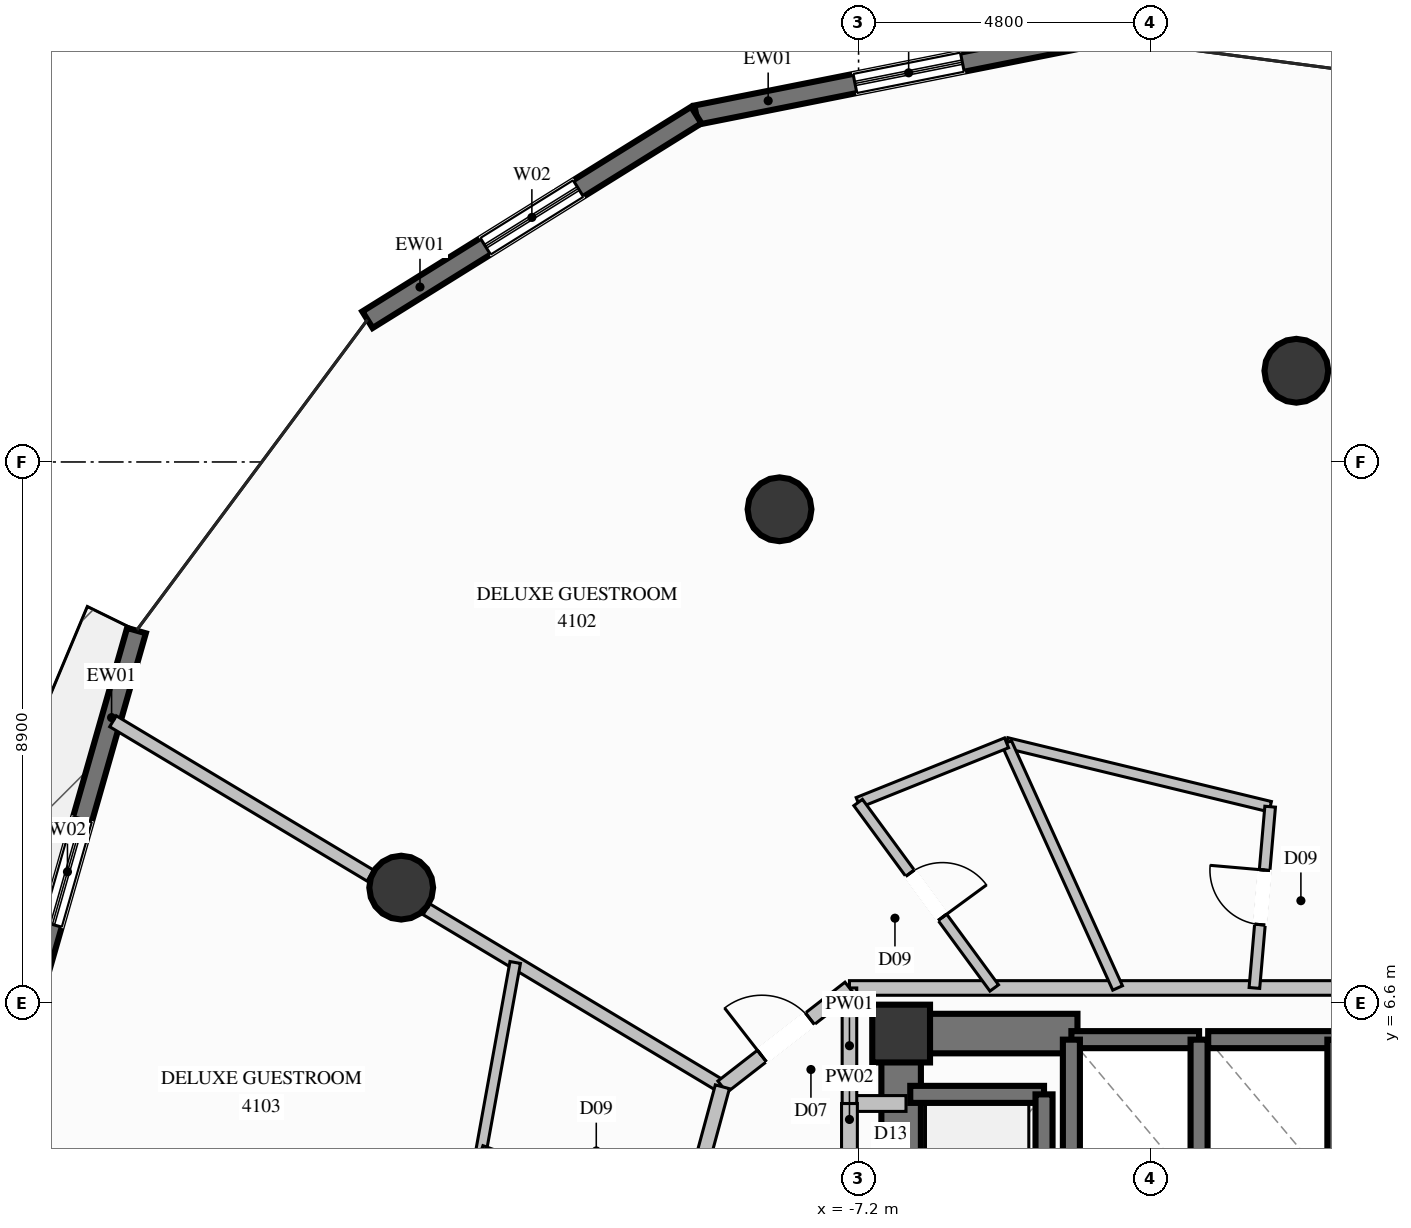
"""IFC4 building model, lengths in metres.
Left out: names, types, materials, properties, quantities, classifications, styles, units other than length and angle.
Written with IfcOpenShell. Run it as: python <this file> out.ifc"""

import sys

from ifc_helpers import new_model, si_unit, direction, frame, frame_2d, origin, origin_2d, place, context, subcontext, project, spatial, rectangle, circle, extrude, element, fill, save


model = new_model("IFC4")
c1 = context("Model", 3, precision=1e-05, world=origin(), true_north=direction((0.0, 1.0)))
c2 = subcontext(c1, "Body", "Model", "MODEL_VIEW")
j1 = project(units=[si_unit("LENGTHUNIT", "METRE"), si_unit("PLANEANGLEUNIT", "RADIAN")], contexts=[c1])
p1 = place(None, origin())
s1 = spatial("IfcSite", under=j1, at=p1, CompositionType="ELEMENT")
p2 = place(p1, origin())
s2 = spatial("IfcBuilding", under=s1, at=p2, CompositionType="ELEMENT")
p3 = place(p2, frame((0.0, 0.0, 153.0)))
s3 = spatial("IfcBuildingStorey", under=s2, at=p3, CompositionType="ELEMENT", Elevation=153.0)
p4 = place(p3, frame((-6.5, 6.1, 0.0), z_axis=(0.0, 0.0, 1.0), x_axis=(1.0, 0.0, 0.0)))
e1 = element("IfcColumn", 1, at=p4, inside=s3, PredefinedType="COLUMN", context=c2, shape_type="SweptSolid", body=[
    extrude(rectangle(XDim=0.95, YDim=0.95, at=origin_2d()), origin(), (0.0, 0.0, 1.0), 3.6),
])
p5 = place(p3, frame((-6.175, 6.1, 0.0), z_axis=(0.0, 0.0, 1.0), x_axis=(1.0, 0.0, 0.0)))
e2 = element("IfcWall", 2, at=p5, inside=s3, PredefinedType="SHEAR", context=c2, shape_type="SweptSolid", body=[
    extrude(rectangle(XDim=2.575, YDim=0.65, at=frame_2d((1.288, 0.0))), origin(), (0.0, 0.0, 1.0), 3.6),
])
p6 = place(p3, frame((-6.5, 2.35, 0.0), z_axis=(0.0, 0.0, 1.0), x_axis=(0.0, 1.0, 0.0)))
e3 = element("IfcWall", 3, at=p6, inside=s3, PredefinedType="SHEAR", context=c2, shape_type="SweptSolid", body=[
    extrude(rectangle(XDim=4.075, YDim=0.65, at=frame_2d((2.038, 0.0))), origin(), (0.0, 0.0, 1.0), 3.6),
])
for number, where, z_axis, x_axis in (
    (4, (0.0, 17.0, 0.0), (0.0, 0.0, 1.0), (1.0, 0.0, 0.0)),
    (5, (-8.5, 14.722, 0.0), (0.0, 0.0, 1.0), (1.0, 0.0, 0.0)),
    (6, (-14.722, 8.5, 0.0), (0.0, 0.0, 1.0), (1.0, 0.0, 0.0)),
):
    element("IfcColumn", number, at=place(p3, frame(where, z_axis=z_axis, x_axis=x_axis)), inside=s3, PredefinedType="COLUMN", context=c2, shape_type="SweptSolid", body=[
        extrude(circle(Radius=0.525, at=origin_2d()), origin(), (0.0, 0.0, 1.0), 3.6),
    ])
p7 = place(p3, frame((-9.869, 21.205, 0.0), z_axis=(0.0, 0.0, 1.0), x_axis=(0.980781820462, 0.195107715508, 0.0)))
e7 = element("IfcWall", 7, at=p7, inside=s3, PredefinedType="SOLIDWALL", context=c2, shape_type="SweptSolid", body=[
    extrude(rectangle(XDim=6.612, YDim=0.32, at=frame_2d((3.306, 0.0))), origin(), (0.0, 0.0, 1.0), 3.35),
])
p8 = place(p7, frame((2.661, 0.0, 0.35)))
e8 = element("IfcOpeningElement", 8, at=p8, cuts=e7, PredefinedType="OPENING", context=c2, shape_type="SweptSolid", body=[
    extrude(rectangle(XDim=1.8, YDim=2.6, at=frame_2d((0.9, 1.3))), frame((0.0, 0.17, 0.0), z_axis=(0.0, -1.0, 0.0), x_axis=(1.0, 0.0, 0.0)), (0.0, 0.0, 1.0), 0.34),
])
p9 = place(p3, frame((-15.277, 17.839, 0.0), z_axis=(0.0, 0.0, 1.0), x_axis=(0.848995855188, 0.528399505935, 0.0)))
e9 = element("IfcWall", 9, at=p9, inside=s3, PredefinedType="SOLIDWALL", context=c2, shape_type="SweptSolid", body=[
    extrude(rectangle(XDim=6.37, YDim=0.32, at=frame_2d((3.185, 0.0))), origin(), (0.0, 0.0, 1.0), 3.35),
])
p10 = place(p9, frame((2.285, 0.0, 0.35)))
e10 = element("IfcOpeningElement", 10, at=p10, cuts=e9, PredefinedType="OPENING", context=c2, shape_type="SweptSolid", body=[
    extrude(rectangle(XDim=1.8, YDim=2.6, at=frame_2d((0.9, 1.3))), frame((0.0, 0.17, 0.0), z_axis=(0.0, -1.0, 0.0), x_axis=(1.0, 0.0, 0.0)), (0.0, 0.0, 1.0), 0.34),
])
p11 = place(p3, frame((-20.895, 6.369, 0.0), z_axis=(0.0, 0.0, 1.0), x_axis=(0.275067292431, 0.961424976082, 0.0)))
e11 = element("IfcWall", 11, at=p11, inside=s3, PredefinedType="SOLIDWALL", context=c2, shape_type="SweptSolid", body=[
    extrude(rectangle(XDim=6.613, YDim=0.32, at=frame_2d((3.307, 0.0))), origin(), (0.0, 0.0, 1.0), 3.35),
])
p12 = place(p11, frame((1.587, 0.0, 0.35)))
e12 = element("IfcOpeningElement", 12, at=p12, cuts=e11, PredefinedType="OPENING", context=c2, shape_type="SweptSolid", body=[
    extrude(rectangle(XDim=1.8, YDim=2.6, at=frame_2d((0.9, 1.3))), frame((0.0, 0.17, 0.0), z_axis=(0.0, -1.0, 0.0), x_axis=(1.0, 0.0, 0.0)), (0.0, 0.0, 1.0), 0.34),
])
p13 = place(p3, frame((-1.6, 6.0, 0.0), z_axis=(0.0, 0.0, 1.0), x_axis=(-1.0, 0.0, 0.0)))
e13 = element("IfcWall", 13, at=p13, inside=s3, PredefinedType="SOLIDWALL", context=c2, shape_type="SweptSolid", body=[
    extrude(rectangle(XDim=2.1, YDim=0.28, at=frame_2d((1.05, 0.0))), origin(), (0.0, 0.0, 1.0), 3.35),
])
for number, where, z_axis, x_axis in (
    (14, (-3.7, 6.0, 0.0), (0.0, 0.0, 1.0), (0.0, -1.0, 0.0)),
    (15, (-1.6, 3.5, 0.0), (0.0, 0.0, 1.0), (0.0, 1.0, 0.0)),
):
    element("IfcWall", number, at=place(p3, frame(where, z_axis=z_axis, x_axis=x_axis)), inside=s3, PredefinedType="SOLIDWALL", context=c2, shape_type="SweptSolid", body=[
        extrude(rectangle(XDim=2.5, YDim=0.28, at=frame_2d((1.25, 0.0))), origin(), (0.0, 0.0, 1.0), 3.35),
    ])
p14 = place(p3, frame((0.65, 6.0, 0.0), z_axis=(0.0, 0.0, 1.0), x_axis=(-1.0, 0.0, 0.0)))
e16 = element("IfcWall", 16, at=p14, inside=s3, PredefinedType="SOLIDWALL", context=c2, shape_type="SweptSolid", body=[
    extrude(rectangle(XDim=2.1, YDim=0.28, at=frame_2d((1.05, 0.0))), origin(), (0.0, 0.0, 1.0), 3.35),
])
p15 = place(p3, frame((0.65, 3.5, 0.0), z_axis=(0.0, 0.0, 1.0), x_axis=(0.0, 1.0, 0.0)))
e17 = element("IfcWall", 17, at=p15, inside=s3, PredefinedType="SOLIDWALL", context=c2, shape_type="SweptSolid", body=[
    extrude(rectangle(XDim=2.5, YDim=0.28, at=frame_2d((1.25, 0.0))), origin(), (0.0, 0.0, 1.0), 3.35),
])
p16 = place(p3, frame((-4.15, 5.1, 0.0), z_axis=(0.0, 0.0, 1.0), x_axis=(-1.0, 0.0, 0.0)))
e18 = element("IfcWall", 18, at=p16, inside=s3, PredefinedType="SOLIDWALL", context=c2, shape_type="SweptSolid", body=[
    extrude(rectangle(XDim=2.2, YDim=0.28, at=frame_2d((1.1, 0.0))), origin(), (0.0, 0.0, 1.0), 3.35),
])
p17 = place(p3, frame((-4.15, 2.4, 0.0), z_axis=(0.0, 0.0, 1.0), x_axis=(0.0, 1.0, 0.0)))
e19 = element("IfcWall", 19, at=p17, inside=s3, PredefinedType="SOLIDWALL", context=c2, shape_type="SweptSolid", body=[
    extrude(rectangle(XDim=2.7, YDim=0.28, at=frame_2d((1.35, 0.0))), origin(), (0.0, 0.0, 1.0), 3.35),
])
p18 = place(p3, frame((-7.35, 4.95, 0.0), z_axis=(0.0, 0.0, 1.0), x_axis=(1.0, 0.0, 0.0)))
e20 = element("IfcWall", 20, at=p18, inside=s3, PredefinedType="PARTITIONING", context=c2, shape_type="SweptSolid", body=[
    extrude(rectangle(XDim=0.93, YDim=0.26, at=frame_2d((0.465, 0.0))), origin(), (0.0, 0.0, 1.0), 3.35),
])
p19 = place(p3, frame((-7.35, 2.55, 0.0), z_axis=(0.0, 0.0, 1.0), x_axis=(0.0, 1.0, 0.0)))
e21 = element("IfcWall", 21, at=p19, inside=s3, PredefinedType="PARTITIONING", context=c2, shape_type="SweptSolid", body=[
    extrude(rectangle(XDim=2.4, YDim=0.26, at=frame_2d((1.2, 0.0))), origin(), (0.0, 0.0, 1.0), 2.435),
])
p20 = place(p19, frame((0.775, 0.0, 0.0)))
e22 = element("IfcOpeningElement", 22, at=p20, cuts=e21, PredefinedType="OPENING", context=c2, shape_type="SweptSolid", body=[
    extrude(rectangle(XDim=0.85, YDim=2.05, at=frame_2d((0.425, 1.025))), frame((0.0, 0.14, 0.0), z_axis=(0.0, -1.0, 0.0), x_axis=(1.0, 0.0, 0.0)), (0.0, 0.0, 1.0), 0.28),
])
p21 = place(p3, frame((-7.35, 6.85, 0.0), z_axis=(0.0, 0.0, 1.0), x_axis=(1.0, 0.0, 0.0)))
e23 = element("IfcWall", 23, at=p21, inside=s3, PredefinedType="PARTITIONING", context=c2, shape_type="SweptSolid", body=[
    extrude(rectangle(XDim=14.7, YDim=0.24, at=frame_2d((7.35, 0.0))), origin(), (0.0, 0.0, 1.0), 2.435),
])
p22 = place(p3, frame((-7.35, 4.95, 0.0), z_axis=(0.0, 0.0, 1.0), x_axis=(0.0, 1.0, 0.0)))
e24 = element("IfcWall", 24, at=p22, inside=s3, PredefinedType="PARTITIONING", context=c2, shape_type="SweptSolid", body=[
    extrude(rectangle(XDim=1.9, YDim=0.24, at=frame_2d((0.95, 0.0))), origin(), (0.0, 0.0, 1.0), 2.435),
])
p23 = place(p3, frame((-9.44, 5.225, 0.0), z_axis=(0.0, 0.0, 1.0), x_axis=(-0.857568811906, 0.514369257291, 0.0)))
e25 = element("IfcWall", 25, at=p23, inside=s3, PredefinedType="PARTITIONING", context=c2, shape_type="SweptSolid", body=[
    extrude(rectangle(XDim=5.677, YDim=0.21, at=frame_2d((2.838, 0.0))), origin(), (0.0, 0.0, 1.0), 2.791),
])
p24 = place(p3, frame((-15.23, 8.698, 0.0), z_axis=(0.0, 0.0, 1.0), x_axis=(-0.857588949281, 0.514335682285, 0.0)))
e26 = element("IfcWall", 26, at=p24, inside=s3, PredefinedType="PARTITIONING", context=c2, shape_type="SweptSolid", body=[
    extrude(rectangle(XDim=4.935, YDim=0.21, at=frame_2d((2.467, 0.0))), origin(), (0.0, 0.0, 1.0), 3.35),
])
p25 = place(p3, frame((-4.766, 10.881, 0.0), z_axis=(0.0, 0.0, 1.0), x_axis=(0.971896797285, -0.235407339366, 0.0)))
e27 = element("IfcWall", 27, at=p25, inside=s3, PredefinedType="PLUMBINGWALL", context=c2, shape_type="SweptSolid", body=[
    extrude(rectangle(XDim=4.46, YDim=0.175, at=frame_2d((2.23, 0.0))), origin(), (0.0, 0.0, 1.0), 2.985),
])
p26 = place(p3, frame((-4.766, 10.881, 0.0), z_axis=(0.0, 0.0, 1.0), x_axis=(0.412659574377, -0.910885325206, 0.0)))
e28 = element("IfcWall", 28, at=p26, inside=s3, PredefinedType="PLUMBINGWALL", context=c2, shape_type="SweptSolid", body=[
    extrude(rectangle(XDim=4.425, YDim=0.175, at=frame_2d((2.213, 0.0))), origin(), (0.0, 0.0, 1.0), 3.35),
])
p27 = place(p3, frame((-0.69, 6.85, 0.0), z_axis=(0.0, 0.0, 1.0), x_axis=(0.086569761216, 0.99624579118, 0.0)))
e29 = element("IfcWall", 29, at=p27, inside=s3, PredefinedType="PLUMBINGWALL", context=c2, shape_type="SweptSolid", body=[
    extrude(rectangle(XDim=2.992, YDim=0.175, at=frame_2d((1.496, 0.0))), origin(), (0.0, 0.0, 1.0), 3.35),
])
p28 = place(p27, frame((1.046, 0.0, 0.0)))
e30 = element("IfcOpeningElement", 30, at=p28, cuts=e29, PredefinedType="OPENING", context=c2, shape_type="SweptSolid", body=[
    extrude(rectangle(XDim=0.9, YDim=2.1, at=frame_2d((0.45, 1.05))), frame((0.0, 0.098, 0.0), z_axis=(0.0, -1.0, 0.0), x_axis=(1.0, 0.0, 0.0)), (0.0, 0.0, 1.0), 0.195),
])
p29 = place(p3, frame((-7.207, 9.9, 0.0), z_axis=(0.0, 0.0, 1.0), x_axis=(0.927841720979, 0.372974182498, 0.0)))
e31 = element("IfcWall", 31, at=p29, inside=s3, PredefinedType="PLUMBINGWALL", context=c2, shape_type="SweptSolid", body=[
    extrude(rectangle(XDim=2.631, YDim=0.175, at=frame_2d((1.315, 0.0))), origin(), (0.0, 0.0, 1.0), 2.985),
])
p30 = place(p3, frame((-7.207, 9.9, 0.0), z_axis=(0.0, 0.0, 1.0), x_axis=(0.591623838384, -0.806214136477, 0.0)))
e32 = element("IfcWall", 32, at=p30, inside=s3, PredefinedType="PLUMBINGWALL", context=c2, shape_type="SweptSolid", body=[
    extrude(rectangle(XDim=3.783, YDim=0.175, at=frame_2d((1.892, 0.0))), origin(), (0.0, 0.0, 1.0), 2.791),
])
p31 = place(p30, frame((1.442, 0.0, 0.0)))
e33 = element("IfcOpeningElement", 33, at=p31, cuts=e32, PredefinedType="OPENING", context=c2, shape_type="SweptSolid", body=[
    extrude(rectangle(XDim=0.9, YDim=2.1, at=frame_2d((0.45, 1.05))), frame((0.0, 0.098, 0.0), z_axis=(0.0, -1.0, 0.0), x_axis=(1.0, 0.0, 0.0)), (0.0, 0.0, 1.0), 0.195),
])
p32 = place(p3, frame((-9.44, 5.225, 0.0), z_axis=(0.0, 0.0, 1.0), x_axis=(0.789431664708, 0.613838453306, 0.0)))
e34 = element("IfcWall", 34, at=p32, inside=s3, PredefinedType="PARTITIONING", context=c2, shape_type="SweptSolid", body=[
    extrude(rectangle(XDim=2.647, YDim=0.24, at=frame_2d((1.324, 0.0))), origin(), (0.0, 0.0, 1.0), 3.35),
])
p33 = place(p32, frame((0.824, 0.0, 0.0)))
e35 = element("IfcOpeningElement", 35, at=p33, cuts=e34, PredefinedType="OPENING", context=c2, shape_type="SweptSolid", body=[
    extrude(rectangle(XDim=1.0, YDim=2.2, at=frame_2d((0.5, 1.1))), frame((0.0, 0.13, 0.0), z_axis=(0.0, -1.0, 0.0), x_axis=(1.0, 0.0, 0.0)), (0.0, 0.0, 1.0), 0.26),
])
p34 = place(p3, frame((-9.44, 5.225, 0.0), z_axis=(0.0, 0.0, 1.0), x_axis=(-0.262004776073, -0.965066576623, 0.0)))
e36 = element("IfcWall", 36, at=p34, inside=s3, PredefinedType="PARTITIONING", context=c2, shape_type="SweptSolid", body=[
    extrude(rectangle(XDim=2.34, YDim=0.24, at=frame_2d((1.17, 0.0))), origin(), (0.0, 0.0, 1.0), 3.35),
])
p35 = place(p3, frame((-12.847, 7.269, 0.0), z_axis=(0.0, 0.0, 1.0), x_axis=(-0.178065684041, -0.984018603568, 0.0)))
e37 = element("IfcWall", 37, at=p35, inside=s3, PredefinedType="PLUMBINGWALL", context=c2, shape_type="SweptSolid", body=[
    extrude(rectangle(XDim=3.145, YDim=0.175, at=frame_2d((1.573, 0.0))), origin(), (0.0, 0.0, 1.0), 3.35),
])
p36 = place(p3, frame((-10.053, 2.967, 0.0), z_axis=(0.0, 0.0, 1.0), x_axis=(-0.940924076968, 0.338617603474, 0.0)))
e38 = element("IfcWall", 38, at=p36, inside=s3, PredefinedType="PLUMBINGWALL", context=c2, shape_type="SweptSolid", body=[
    extrude(rectangle(XDim=3.565, YDim=0.175, at=frame_2d((1.782, 0.0))), origin(), (0.0, 0.0, 1.0), 3.35),
])
p37 = place(p36, frame((1.332, 0.0, 0.0)))
e39 = element("IfcOpeningElement", 39, at=p37, cuts=e38, PredefinedType="OPENING", context=c2, shape_type="SweptSolid", body=[
    extrude(rectangle(XDim=0.9, YDim=2.1, at=frame_2d((0.45, 1.05))), frame((0.0, 0.098, 0.0), z_axis=(0.0, -1.0, 0.0), x_axis=(1.0, 0.0, 0.0)), (0.0, 0.0, 1.0), 0.195),
])
p38 = place(p8, origin())
e40 = element("IfcWindow", 40, at=p38, inside=s3, PartitioningType="SINGLE_PANEL", PredefinedType="WINDOW", context=c2, shape_type="SweptSolid", body=[
    extrude(rectangle(XDim=1.8, YDim=2.6, at=frame_2d((0.9, 1.3))), frame((0.0, 0.03, 0.0), z_axis=(0.0, -1.0, 0.0), x_axis=(1.0, 0.0, 0.0)), (0.0, 0.0, 1.0), 0.06),
])
fill(e8, e40)
p39 = place(p10, origin())
e41 = element("IfcWindow", 41, at=p39, inside=s3, PartitioningType="SINGLE_PANEL", PredefinedType="WINDOW", context=c2, shape_type="SweptSolid", body=[
    extrude(rectangle(XDim=1.8, YDim=2.6, at=frame_2d((0.9, 1.3))), frame((0.0, 0.03, 0.0), z_axis=(0.0, -1.0, 0.0), x_axis=(1.0, 0.0, 0.0)), (0.0, 0.0, 1.0), 0.06),
])
fill(e10, e41)
p40 = place(p12, origin())
e42 = element("IfcWindow", 42, at=p40, inside=s3, PartitioningType="SINGLE_PANEL", PredefinedType="WINDOW", context=c2, shape_type="SweptSolid", body=[
    extrude(rectangle(XDim=1.8, YDim=2.6, at=frame_2d((0.9, 1.3))), frame((0.0, 0.03, 0.0), z_axis=(0.0, -1.0, 0.0), x_axis=(1.0, 0.0, 0.0)), (0.0, 0.0, 1.0), 0.06),
])
fill(e12, e42)
p41 = place(p28, origin())
e43 = element("IfcDoor", 43, at=p41, inside=s3, OperationType="SINGLE_SWING_RIGHT", PredefinedType="DOOR", context=c2, shape_type="SweptSolid", body=[
    extrude(rectangle(XDim=0.9, YDim=2.1, at=frame_2d((0.45, 1.05))), frame((0.0, 0.025, 0.0), z_axis=(0.0, -1.0, 0.0), x_axis=(1.0, 0.0, 0.0)), (0.0, 0.0, 1.0), 0.05),
])
fill(e30, e43)
p42 = place(p31, origin())
e44 = element("IfcDoor", 44, at=p42, inside=s3, OperationType="SINGLE_SWING_RIGHT", PredefinedType="DOOR", context=c2, shape_type="SweptSolid", body=[
    extrude(rectangle(XDim=0.9, YDim=2.1, at=frame_2d((0.45, 1.05))), frame((0.0, 0.025, 0.0), z_axis=(0.0, -1.0, 0.0), x_axis=(1.0, 0.0, 0.0)), (0.0, 0.0, 1.0), 0.05),
])
fill(e33, e44)
p43 = place(p33, origin())
e45 = element("IfcDoor", 45, at=p43, inside=s3, OperationType="SINGLE_SWING_LEFT", PredefinedType="DOOR", context=c2, shape_type="SweptSolid", body=[
    extrude(rectangle(XDim=1.0, YDim=2.2, at=frame_2d((0.5, 1.1))), frame((0.0, 0.025, 0.0), z_axis=(0.0, -1.0, 0.0), x_axis=(1.0, 0.0, 0.0)), (0.0, 0.0, 1.0), 0.05),
])
fill(e35, e45)
save(model, sys.argv[1])
